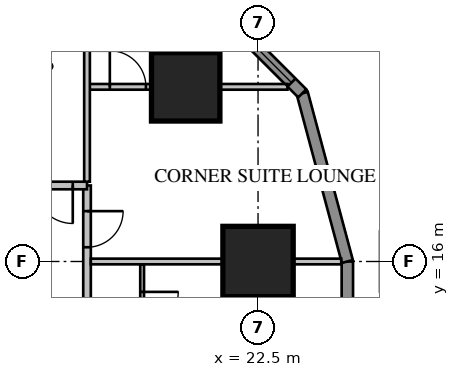
"""IFC4 building model, lengths in metres.
Left out: names, types, materials, properties, quantities, classifications, styles, units other than length and angle.
Written with IfcOpenShell. Run it as: python <this file> out.ifc"""

import sys

from ifc_helpers import new_model, si_unit, direction, frame, frame_2d, origin, origin_2d, place, context, subcontext, project, spatial, rectangle, extrude, element, fill, save


model = new_model("IFC4")
c1 = context("Model", 3, precision=1e-05, world=origin(), true_north=direction((0.0, 1.0)))
c2 = subcontext(c1, "Body", "Model", "MODEL_VIEW")
j1 = project(units=[si_unit("LENGTHUNIT", "METRE"), si_unit("PLANEANGLEUNIT", "RADIAN")], contexts=[c1])
p1 = place(None, origin())
s1 = spatial("IfcSite", under=j1, at=p1, CompositionType="ELEMENT")
p2 = place(p1, origin())
s2 = spatial("IfcBuilding", under=s1, at=p2, CompositionType="ELEMENT")
p3 = place(p2, frame((0.0, 0.0, 39.1)))
s3 = spatial("IfcBuildingStorey", under=s2, at=p3, CompositionType="ELEMENT", Elevation=39.1)
p4 = place(p3, frame((22.5, 16.0, 0.0), z_axis=(0.0, 0.0, 1.0), x_axis=(1.0, 0.0, 0.0)))
e1 = element("IfcColumn", 1, at=p4, inside=s3, PredefinedType="COLUMN", context=c2, shape_type="SweptSolid", body=[
    extrude(rectangle(XDim=1.85, YDim=1.85, at=origin_2d()), origin(), (0.0, 0.0, 1.0), 3.85),
])
p5 = place(p3, frame((20.596, 20.596, 0.0), z_axis=(0.0, 0.0, 1.0), x_axis=(1.0, 0.0, 0.0)))
e2 = element("IfcColumn", 2, at=p5, inside=s3, PredefinedType="COLUMN", context=c2, shape_type="SweptSolid", body=[
    extrude(rectangle(XDim=1.8, YDim=1.8, at=origin_2d()), origin(), (0.0, 0.0, 1.0), 3.85),
])
p6 = place(p3, frame((24.85, -16.0, 0.0), z_axis=(0.0, 0.0, 1.0), x_axis=(0.0, 1.0, 0.0)))
e3 = element("IfcWall", 3, at=p6, inside=s3, PredefinedType="SOLIDWALL", context=c2, shape_type="SweptSolid", body=[
    extrude(rectangle(XDim=32.0, YDim=0.3, at=frame_2d((16.0, 0.0))), origin(), (0.0, 0.0, 1.0), 3.65),
])
p7 = place(p6, frame((1.2, 0.0, 0.75)))
e4 = element("IfcOpeningElement", 4, at=p7, cuts=e3, PredefinedType="OPENING", context=c2, shape_type="SweptSolid", body=[
    extrude(rectangle(XDim=1.6, YDim=1.8, at=frame_2d((0.8, 0.9))), frame((0.0, 0.17, 0.0), z_axis=(0.0, -1.0, 0.0), x_axis=(1.0, 0.0, 0.0)), (0.0, 0.0, 1.0), 0.34),
])
p8 = place(p6, frame((5.2, 0.0, 0.75)))
e5 = element("IfcOpeningElement", 5, at=p8, cuts=e3, PredefinedType="OPENING", context=c2, shape_type="SweptSolid", body=[
    extrude(rectangle(XDim=1.6, YDim=1.8, at=frame_2d((0.8, 0.9))), frame((0.0, 0.17, 0.0), z_axis=(0.0, -1.0, 0.0), x_axis=(1.0, 0.0, 0.0)), (0.0, 0.0, 1.0), 0.34),
])
p9 = place(p6, frame((17.2, 0.0, 0.75)))
e6 = element("IfcOpeningElement", 6, at=p9, cuts=e3, PredefinedType="OPENING", context=c2, shape_type="SweptSolid", body=[
    extrude(rectangle(XDim=1.6, YDim=1.8, at=frame_2d((0.8, 0.9))), frame((0.0, 0.17, 0.0), z_axis=(0.0, -1.0, 0.0), x_axis=(1.0, 0.0, 0.0)), (0.0, 0.0, 1.0), 0.34),
])
p10 = place(p6, frame((21.2, 0.0, 0.75)))
e7 = element("IfcOpeningElement", 7, at=p10, cuts=e3, PredefinedType="OPENING", context=c2, shape_type="SweptSolid", body=[
    extrude(rectangle(XDim=1.6, YDim=1.8, at=frame_2d((0.8, 0.9))), frame((0.0, 0.17, 0.0), z_axis=(0.0, -1.0, 0.0), x_axis=(1.0, 0.0, 0.0)), (0.0, 0.0, 1.0), 0.34),
])
p11 = place(p6, frame((25.2, 0.0, 0.75)))
e8 = element("IfcOpeningElement", 8, at=p11, cuts=e3, PredefinedType="OPENING", context=c2, shape_type="SweptSolid", body=[
    extrude(rectangle(XDim=1.6, YDim=1.8, at=frame_2d((0.8, 0.9))), frame((0.0, 0.17, 0.0), z_axis=(0.0, -1.0, 0.0), x_axis=(1.0, 0.0, 0.0)), (0.0, 0.0, 1.0), 0.34),
])
p12 = place(p6, frame((29.2, 0.0, 0.75)))
e9 = element("IfcOpeningElement", 9, at=p12, cuts=e3, PredefinedType="OPENING", context=c2, shape_type="SweptSolid", body=[
    extrude(rectangle(XDim=1.6, YDim=1.8, at=frame_2d((0.8, 0.9))), frame((0.0, 0.17, 0.0), z_axis=(0.0, -1.0, 0.0), x_axis=(1.0, 0.0, 0.0)), (0.0, 0.0, 1.0), 0.34),
])
p13 = place(p6, frame((8.8, 0.0, 0.75)))
e10 = element("IfcOpeningElement", 10, at=p13, cuts=e3, PredefinedType="OPENING", context=c2, shape_type="SweptSolid", body=[
    extrude(rectangle(XDim=2.4, YDim=1.8, at=frame_2d((1.2, 0.9))), frame((0.0, 0.17, 0.0), z_axis=(0.0, -1.0, 0.0), x_axis=(1.0, 0.0, 0.0)), (0.0, 0.0, 1.0), 0.34),
])
p14 = place(p6, frame((13.812, 0.0, 0.0)))
e11 = element("IfcOpeningElement", 11, at=p14, cuts=e3, PredefinedType="OPENING", context=c2, shape_type="SweptSolid", body=[
    extrude(rectangle(XDim=1.0, YDim=2.4, at=frame_2d((0.5, 1.2))), frame((0.0, 0.17, 0.0), z_axis=(0.0, -1.0, 0.0), x_axis=(1.0, 0.0, 0.0)), (0.0, 0.0, 1.0), 0.34),
])
p15 = place(p3, frame((24.85, 16.0, 0.0), z_axis=(0.0, 0.0, 1.0), x_axis=(-0.258839972501, 0.965920218567, 0.0)))
e12 = element("IfcWall", 12, at=p15, inside=s3, PredefinedType="SOLIDWALL", context=c2, shape_type="SweptSolid", body=[
    extrude(rectangle(XDim=4.581, YDim=0.3, at=frame_2d((2.291, 0.0))), origin(), (0.0, 0.0, 1.0), 3.65),
])
p16 = place(p3, frame((23.664, 20.425, 0.0), z_axis=(0.0, 0.0, 1.0), x_axis=(-0.707106781187, 0.707106781187, 0.0)))
e13 = element("IfcWall", 13, at=p16, inside=s3, PredefinedType="SOLIDWALL", context=c2, shape_type="SweptSolid", body=[
    extrude(rectangle(XDim=4.581, YDim=0.3, at=frame_2d((2.291, 0.0))), origin(), (0.0, 0.0, 1.0), 3.65),
])
p17 = place(p16, frame((0.4, 0.0, 0.75)))
e14 = element("IfcOpeningElement", 14, at=p17, cuts=e13, PredefinedType="OPENING", context=c2, shape_type="SweptSolid", body=[
    extrude(rectangle(XDim=3.781, YDim=1.8, at=frame_2d((1.891, 0.9))), frame((0.0, 0.17, 0.0), z_axis=(0.0, -1.0, 0.0), x_axis=(1.0, 0.0, 0.0)), (0.0, 0.0, 1.0), 0.34),
])
p18 = place(p3, frame((18.0, -18.0, 0.0), z_axis=(0.0, 0.0, 1.0), x_axis=(0.0, 1.0, 0.0)))
e15 = element("IfcWall", 15, at=p18, inside=s3, PredefinedType="PARTITIONING", context=c2, shape_type="SweptSolid", body=[
    extrude(rectangle(XDim=36.0, YDim=0.2, at=frame_2d((18.0, 0.0))), origin(), (0.0, 0.0, 1.0), 3.65),
])
p19 = place(p18, frame((10.4, 0.0, 0.0)))
e16 = element("IfcOpeningElement", 16, at=p19, cuts=e15, PredefinedType="OPENING", context=c2, shape_type="SweptSolid", body=[
    extrude(rectangle(XDim=1.0, YDim=2.1, at=frame_2d((0.5, 1.05))), frame((0.0, 0.12, 0.0), z_axis=(0.0, -1.0, 0.0), x_axis=(1.0, 0.0, 0.0)), (0.0, 0.0, 1.0), 0.24),
])
p20 = place(p18, frame((0.375, 0.0, 0.0)))
e17 = element("IfcOpeningElement", 17, at=p20, cuts=e15, PredefinedType="OPENING", context=c2, shape_type="SweptSolid", body=[
    extrude(rectangle(XDim=1.0, YDim=2.1, at=frame_2d((0.5, 1.05))), frame((0.0, 0.12, 0.0), z_axis=(0.0, -1.0, 0.0), x_axis=(1.0, 0.0, 0.0)), (0.0, 0.0, 1.0), 0.24),
])
p21 = place(p18, frame((34.375, 0.0, 0.0)))
e18 = element("IfcOpeningElement", 18, at=p21, cuts=e15, PredefinedType="OPENING", context=c2, shape_type="SweptSolid", body=[
    extrude(rectangle(XDim=0.95, YDim=2.1, at=frame_2d((0.475, 1.05))), frame((0.0, 0.12, 0.0), z_axis=(0.0, -1.0, 0.0), x_axis=(1.0, 0.0, 0.0)), (0.0, 0.0, 1.0), 0.24),
])
p22 = place(p3, frame((19.45, -15.925, 0.0), z_axis=(0.0, 0.0, 1.0), x_axis=(0.0, 1.0, 0.0)))
e19 = element("IfcWall", 19, at=p22, inside=s3, PredefinedType="PARTITIONING", context=c2, shape_type="SweptSolid", body=[
    extrude(rectangle(XDim=31.85, YDim=0.1, at=frame_2d((15.925, 0.0))), origin(), (0.0, 0.0, 1.0), 3.65),
])
p23 = place(p22, frame((10.125, 0.0, 0.0)))
e20 = element("IfcOpeningElement", 20, at=p23, cuts=e19, PredefinedType="OPENING", context=c2, shape_type="SweptSolid", body=[
    extrude(rectangle(XDim=1.0, YDim=2.1, at=frame_2d((0.5, 1.05))), frame((0.0, 0.07, 0.0), z_axis=(0.0, -1.0, 0.0), x_axis=(1.0, 0.0, 0.0)), (0.0, 0.0, 1.0), 0.14),
])
p24 = place(p22, frame((8.3, 0.0, 0.0)))
e21 = element("IfcOpeningElement", 21, at=p24, cuts=e19, PredefinedType="OPENING", context=c2, shape_type="SweptSolid", body=[
    extrude(rectangle(XDim=0.8, YDim=2.1, at=frame_2d((0.4, 1.05))), frame((0.0, 0.07, 0.0), z_axis=(0.0, -1.0, 0.0), x_axis=(1.0, 0.0, 0.0)), (0.0, 0.0, 1.0), 0.14),
])
p25 = place(p22, frame((0.3, 0.0, 0.0)))
e22 = element("IfcOpeningElement", 22, at=p25, cuts=e19, PredefinedType="OPENING", context=c2, shape_type="SweptSolid", body=[
    extrude(rectangle(XDim=0.95, YDim=2.1, at=frame_2d((0.475, 1.05))), frame((0.0, 0.07, 0.0), z_axis=(0.0, -1.0, 0.0), x_axis=(1.0, 0.0, 0.0)), (0.0, 0.0, 1.0), 0.14),
])
p26 = place(p22, frame((6.175, 0.0, 0.0)))
e23 = element("IfcOpeningElement", 23, at=p26, cuts=e19, PredefinedType="OPENING", context=c2, shape_type="SweptSolid", body=[
    extrude(rectangle(XDim=0.95, YDim=2.1, at=frame_2d((0.475, 1.05))), frame((0.0, 0.07, 0.0), z_axis=(0.0, -1.0, 0.0), x_axis=(1.0, 0.0, 0.0)), (0.0, 0.0, 1.0), 0.14),
])
p27 = place(p22, frame((16.3, 0.0, 0.0)))
e24 = element("IfcOpeningElement", 24, at=p27, cuts=e19, PredefinedType="OPENING", context=c2, shape_type="SweptSolid", body=[
    extrude(rectangle(XDim=0.95, YDim=2.1, at=frame_2d((0.475, 1.05))), frame((0.0, 0.07, 0.0), z_axis=(0.0, -1.0, 0.0), x_axis=(1.0, 0.0, 0.0)), (0.0, 0.0, 1.0), 0.14),
])
p28 = place(p22, frame((22.175, 0.0, 0.0)))
e25 = element("IfcOpeningElement", 25, at=p28, cuts=e19, PredefinedType="OPENING", context=c2, shape_type="SweptSolid", body=[
    extrude(rectangle(XDim=0.95, YDim=2.1, at=frame_2d((0.475, 1.05))), frame((0.0, 0.07, 0.0), z_axis=(0.0, -1.0, 0.0), x_axis=(1.0, 0.0, 0.0)), (0.0, 0.0, 1.0), 0.14),
])
p29 = place(p22, frame((24.3, 0.0, 0.0)))
e26 = element("IfcOpeningElement", 26, at=p29, cuts=e19, PredefinedType="OPENING", context=c2, shape_type="SweptSolid", body=[
    extrude(rectangle(XDim=0.95, YDim=2.1, at=frame_2d((0.475, 1.05))), frame((0.0, 0.07, 0.0), z_axis=(0.0, -1.0, 0.0), x_axis=(1.0, 0.0, 0.0)), (0.0, 0.0, 1.0), 0.14),
])
p30 = place(p22, frame((30.175, 0.0, 0.0)))
e27 = element("IfcOpeningElement", 27, at=p30, cuts=e19, PredefinedType="OPENING", context=c2, shape_type="SweptSolid", body=[
    extrude(rectangle(XDim=0.95, YDim=2.1, at=frame_2d((0.475, 1.05))), frame((0.0, 0.07, 0.0), z_axis=(0.0, -1.0, 0.0), x_axis=(1.0, 0.0, 0.0)), (0.0, 0.0, 1.0), 0.14),
])
p31 = place(p3, frame((18.1, 16.0, 0.0), z_axis=(0.0, 0.0, 1.0), x_axis=(1.0, 0.0, 0.0)))
e28 = element("IfcWall", 28, at=p31, inside=s3, PredefinedType="PARTITIONING", context=c2, shape_type="SweptSolid", body=[
    extrude(rectangle(XDim=6.589, YDim=0.15, at=frame_2d((3.295, 0.0))), origin(), (0.0, 0.0, 1.0), 3.65),
])
p32 = place(p3, frame((18.065, 20.596, 0.0), z_axis=(0.0, 0.0, 1.0), x_axis=(1.0, 0.0, 0.0)))
e29 = element("IfcWall", 29, at=p32, inside=s3, PredefinedType="PARTITIONING", context=c2, shape_type="SweptSolid", body=[
    extrude(rectangle(XDim=5.209, YDim=0.15, at=frame_2d((2.604, 0.0))), origin(), (0.0, 0.0, 1.0), 3.65),
])
p33 = place(p32, frame((0.535, 0.0, 0.0)))
e30 = element("IfcOpeningElement", 30, at=p33, cuts=e29, PredefinedType="OPENING", context=c2, shape_type="SweptSolid", body=[
    extrude(rectangle(XDim=0.95, YDim=2.1, at=frame_2d((0.475, 1.05))), frame((0.0, 0.095, 0.0), z_axis=(0.0, -1.0, 0.0), x_axis=(1.0, 0.0, 0.0)), (0.0, 0.0, 1.0), 0.19),
])
p34 = place(p3, frame((18.0, 18.0, 0.0), z_axis=(0.0, 0.0, 1.0), x_axis=(-1.0, 0.0, 0.0)))
e31 = element("IfcWall", 31, at=p34, inside=s3, PredefinedType="PARTITIONING", context=c2, shape_type="SweptSolid", body=[
    extrude(rectangle(XDim=36.0, YDim=0.2, at=frame_2d((18.0, 0.0))), origin(), (0.0, 0.0, 1.0), 3.65),
])
p35 = place(p34, frame((10.4, 0.0, 0.0)))
e32 = element("IfcOpeningElement", 32, at=p35, cuts=e31, PredefinedType="OPENING", context=c2, shape_type="SweptSolid", body=[
    extrude(rectangle(XDim=1.0, YDim=2.1, at=frame_2d((0.5, 1.05))), frame((0.0, 0.12, 0.0), z_axis=(0.0, -1.0, 0.0), x_axis=(1.0, 0.0, 0.0)), (0.0, 0.0, 1.0), 0.24),
])
p36 = place(p34, frame((0.375, 0.0, 0.0)))
e33 = element("IfcOpeningElement", 33, at=p36, cuts=e31, PredefinedType="OPENING", context=c2, shape_type="SweptSolid", body=[
    extrude(rectangle(XDim=1.0, YDim=2.1, at=frame_2d((0.5, 1.05))), frame((0.0, 0.12, 0.0), z_axis=(0.0, -1.0, 0.0), x_axis=(1.0, 0.0, 0.0)), (0.0, 0.0, 1.0), 0.24),
])
p37 = place(p34, frame((34.375, 0.0, 0.0)))
e34 = element("IfcOpeningElement", 34, at=p37, cuts=e31, PredefinedType="OPENING", context=c2, shape_type="SweptSolid", body=[
    extrude(rectangle(XDim=0.95, YDim=2.1, at=frame_2d((0.475, 1.05))), frame((0.0, 0.12, 0.0), z_axis=(0.0, -1.0, 0.0), x_axis=(1.0, 0.0, 0.0)), (0.0, 0.0, 1.0), 0.24),
])
p38 = place(p3, frame((18.0, 18.1, 0.0), z_axis=(0.0, 0.0, 1.0), x_axis=(0.0, 1.0, 0.0)))
e35 = element("IfcWall", 35, at=p38, inside=s3, PredefinedType="PARTITIONING", context=c2, shape_type="SweptSolid", body=[
    extrude(rectangle(XDim=6.053, YDim=0.15, at=frame_2d((3.027, 0.0))), origin(), (0.0, 0.0, 1.0), 3.65),
])
p39 = place(p17, origin())
e36 = element("IfcWindow", 36, at=p39, inside=s3, PartitioningType="SINGLE_PANEL", PredefinedType="WINDOW", context=c2, shape_type="SweptSolid", body=[
    extrude(rectangle(XDim=3.781, YDim=1.8, at=frame_2d((1.891, 0.9))), frame((0.0, 0.03, 0.0), z_axis=(0.0, -1.0, 0.0), x_axis=(1.0, 0.0, 0.0)), (0.0, 0.0, 1.0), 0.06),
])
fill(e14, e36)
p40 = place(p30, origin())
e37 = element("IfcDoor", 37, at=p40, inside=s3, OperationType="SINGLE_SWING_RIGHT", PredefinedType="DOOR", context=c2, shape_type="SweptSolid", body=[
    extrude(rectangle(XDim=0.95, YDim=2.1, at=frame_2d((0.475, 1.05))), frame((0.0, 0.025, 0.0), z_axis=(0.0, -1.0, 0.0), x_axis=(1.0, 0.0, 0.0)), (0.0, 0.0, 1.0), 0.05),
])
fill(e27, e37)
p41 = place(p21, origin())
e38 = element("IfcDoor", 38, at=p41, inside=s3, OperationType="SINGLE_SWING_RIGHT", PredefinedType="DOOR", context=c2, shape_type="SweptSolid", body=[
    extrude(rectangle(XDim=0.95, YDim=2.1, at=frame_2d((0.475, 1.05))), frame((0.0, 0.025, 0.0), z_axis=(0.0, -1.0, 0.0), x_axis=(1.0, 0.0, 0.0)), (0.0, 0.0, 1.0), 0.05),
])
fill(e18, e38)
p42 = place(p33, origin())
e39 = element("IfcDoor", 39, at=p42, inside=s3, OperationType="SINGLE_SWING_LEFT", PredefinedType="DOOR", context=c2, shape_type="SweptSolid", body=[
    extrude(rectangle(XDim=0.95, YDim=2.1, at=frame_2d((0.475, 1.05))), frame((0.0, 0.025, 0.0), z_axis=(0.0, -1.0, 0.0), x_axis=(1.0, 0.0, 0.0)), (0.0, 0.0, 1.0), 0.05),
])
fill(e30, e39)
p43 = place(p36, origin())
e40 = element("IfcDoor", 40, at=p43, inside=s3, OperationType="SINGLE_SWING_LEFT", PredefinedType="DOOR", context=c2, shape_type="SweptSolid", body=[
    extrude(rectangle(XDim=1.0, YDim=2.1, at=frame_2d((0.5, 1.05))), frame((0.0, 0.025, 0.0), z_axis=(0.0, -1.0, 0.0), x_axis=(1.0, 0.0, 0.0)), (0.0, 0.0, 1.0), 0.05),
])
fill(e33, e40)
save(model, sys.argv[1])
